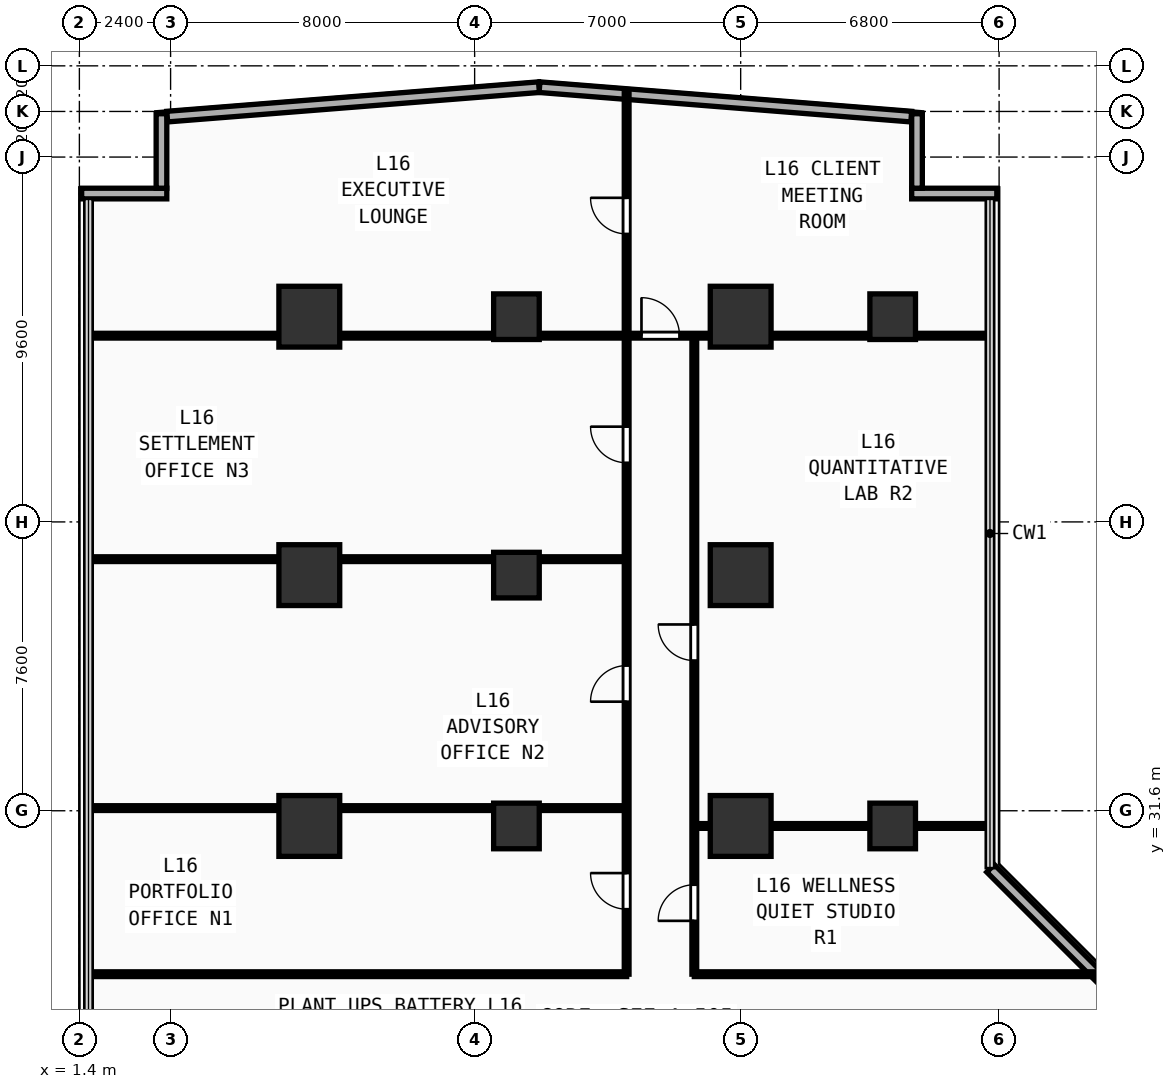
"""IFC4 building model, lengths in metres.
Left out: names, types, materials, properties, quantities, classifications, styles, units other than length and angle.
Written with IfcOpenShell. Run it as: python <this file> out.ifc"""

import sys

from ifc_helpers import new_model, si_unit, direction, frame, frame_2d, origin, origin_2d, place, context, subcontext, project, spatial, rectangle, extrude, element, fill, save


model = new_model("IFC4")
c1 = context("Model", 3, precision=1e-05, world=origin(), true_north=direction((0.0, 1.0)))
c2 = subcontext(c1, "Body", "Model", "MODEL_VIEW")
j1 = project(units=[si_unit("LENGTHUNIT", "METRE"), si_unit("PLANEANGLEUNIT", "RADIAN")], contexts=[c1])
p1 = place(None, origin())
s1 = spatial("IfcSite", under=j1, at=p1, CompositionType="ELEMENT")
p2 = place(p1, origin())
s2 = spatial("IfcBuilding", under=s1, at=p2, CompositionType="ELEMENT")
p3 = place(p2, frame((0.0, 0.0, 63.8)))
s3 = spatial("IfcBuildingStorey", under=s2, at=p3, CompositionType="ELEMENT", Elevation=63.8)
for number, where, z_axis, x_axis in (
    (1, (7.45, 31.2, 0.0), (0.0, 0.0, 1.0), (1.0, 0.0, 0.0)),
    (2, (7.45, 37.8, 0.0), (0.0, 0.0, 1.0), (1.0, 0.0, 0.0)),
    (3, (7.45, 44.6, 0.0), (0.0, 0.0, 1.0), (1.0, 0.0, 0.0)),
    (4, (18.8, 31.2, 0.0), (0.0, 0.0, 1.0), (1.0, 0.0, 0.0)),
    (5, (18.8, 37.8, 0.0), (0.0, 0.0, 1.0), (1.0, 0.0, 0.0)),
    (6, (18.8, 44.6, 0.0), (0.0, 0.0, 1.0), (1.0, 0.0, 0.0)),
):
    element("IfcColumn", number, at=place(p3, frame(where, z_axis=z_axis, x_axis=x_axis)), inside=s3, PredefinedType="COLUMN", context=c2, shape_type="SweptSolid", body=[
        extrude(rectangle(XDim=1.6, YDim=1.6, at=origin_2d()), origin(), (0.0, 0.0, 1.0), 3.54),
    ])
for number, where, z_axis, x_axis in (
    (7, (22.8, 31.2, 0.0), (0.0, 0.0, 1.0), (1.0, 0.0, 0.0)),
    (8, (22.8, 44.6, 0.0), (0.0, 0.0, 1.0), (1.0, 0.0, 0.0)),
    (9, (12.9, 31.2, 0.0), (0.0, 0.0, 1.0), (1.0, 0.0, 0.0)),
    (10, (12.9, 37.8, 0.0), (0.0, 0.0, 1.0), (1.0, 0.0, 0.0)),
    (11, (12.9, 44.6, 0.0), (0.0, 0.0, 1.0), (1.0, 0.0, 0.0)),
):
    element("IfcColumn", number, at=place(p3, frame(where, z_axis=z_axis, x_axis=x_axis)), inside=s3, PredefinedType="COLUMN", context=c2, shape_type="SweptSolid", body=[
        extrude(rectangle(XDim=1.2, YDim=1.2, at=origin_2d()), origin(), (0.0, 0.0, 1.0), 3.54),
    ])
p4 = place(p3, frame((23.3, 47.84, 0.0), z_axis=(0.0, 0.0, 1.0), x_axis=(1.0, 0.0, 0.0)))
e12 = element("IfcWall", 12, at=p4, inside=s3, PredefinedType="SOLIDWALL", context=c2, shape_type="SweptSolid", body=[
    extrude(rectangle(XDim=2.24, YDim=0.28, at=frame_2d((1.12, 0.0))), origin(), (0.0, 0.0, 1.0), 3.54),
])
p5 = place(p3, frame((23.44, 47.98, 0.0), z_axis=(0.0, 0.0, 1.0), x_axis=(0.0, 1.0, 0.0)))
e13 = element("IfcWall", 13, at=p5, inside=s3, PredefinedType="SOLIDWALL", context=c2, shape_type="SweptSolid", body=[
    extrude(rectangle(XDim=1.96, YDim=0.28, at=frame_2d((0.98, 0.0))), origin(), (0.0, 0.0, 1.0), 3.54),
])
p6 = place(p3, frame((1.46, 47.84, 0.0), z_axis=(0.0, 0.0, 1.0), x_axis=(1.0, 0.0, 0.0)))
e14 = element("IfcWall", 14, at=p6, inside=s3, PredefinedType="SOLIDWALL", context=c2, shape_type="SweptSolid", body=[
    extrude(rectangle(XDim=2.24, YDim=0.28, at=frame_2d((1.12, 0.0))), origin(), (0.0, 0.0, 1.0), 3.54),
])
p7 = place(p3, frame((3.56, 47.98, 0.0), z_axis=(0.0, 0.0, 1.0), x_axis=(0.0, 1.0, 0.0)))
e15 = element("IfcWall", 15, at=p7, inside=s3, PredefinedType="SOLIDWALL", context=c2, shape_type="SweptSolid", body=[
    extrude(rectangle(XDim=1.96, YDim=0.28, at=frame_2d((0.98, 0.0))), origin(), (0.0, 0.0, 1.0), 3.54),
])
p8 = place(p3, frame((31.885, 23.575, 0.0), z_axis=(0.0, 0.0, 1.0), x_axis=(-0.707106781187, 0.707106781187, 0.0)))
e16 = element("IfcWall", 16, at=p8, inside=s3, PredefinedType="SOLIDWALL", context=c2, shape_type="SweptSolid", body=[
    extrude(rectangle(XDim=9.207, YDim=0.28, at=frame_2d((4.603, 0.0))), origin(), (0.0, 0.0, 1.0), 3.54),
])
for number, where, z_axis, x_axis in (
    (17, (23.288, 49.864, 0.0), (0.0, 0.0, 1.0), (-0.997, 0.079, 0.0)),
    (18, (13.493, 50.639, 0.0), (0.0, 0.0, 1.0), (-0.997, -0.079, 0.0)),
):
    element("IfcWall", number, at=place(p3, frame(where, z_axis=z_axis, x_axis=x_axis)), inside=s3, PredefinedType="SOLIDWALL", context=c2, shape_type="SweptSolid", body=[
        extrude(rectangle(XDim=9.812, YDim=0.28, at=frame_2d((4.906, 0.0))), origin(), (0.0, 0.0, 1.0), 3.54),
    ])
p9 = place(p3, frame((1.64, 27.3, 0.0), z_axis=(0.0, 0.0, 1.0), x_axis=(1.0, 0.0, 0.0)))
e19 = element("IfcWall", 19, at=p9, inside=s3, PredefinedType="PARTITIONING", context=c2, shape_type="SweptSolid", body=[
    extrude(rectangle(XDim=14.16, YDim=0.125, at=frame_2d((7.08, 0.0))), origin(), (0.0, 0.0, 1.0), 3.54),
])
p10 = place(p3, frame((15.8, 27.3, 0.0), z_axis=(0.0, 0.0, 1.0), x_axis=(0.0, 1.0, 0.0)))
e20 = element("IfcWall", 20, at=p10, inside=s3, PredefinedType="PARTITIONING", context=c2, shape_type="SweptSolid", body=[
    extrude(rectangle(XDim=16.8, YDim=0.125, at=frame_2d((8.4, 0.0))), origin(), (0.0, 0.0, 1.0), 3.54),
])
p11 = place(p10, frame((1.71, 0.0, 0.0)))
e21 = element("IfcOpeningElement", 21, at=p11, cuts=e20, PredefinedType="OPENING", context=c2, shape_type="SweptSolid", body=[
    extrude(rectangle(XDim=0.95, YDim=2.15, at=frame_2d((0.475, 1.075))), frame((0.0, 0.073, 0.0), z_axis=(0.0, -1.0, 0.0), x_axis=(1.0, 0.0, 0.0)), (0.0, 0.0, 1.0), 0.145),
])
p12 = place(p10, frame((7.17, 0.0, 0.0)))
e22 = element("IfcOpeningElement", 22, at=p12, cuts=e20, PredefinedType="OPENING", context=c2, shape_type="SweptSolid", body=[
    extrude(rectangle(XDim=0.95, YDim=2.15, at=frame_2d((0.475, 1.075))), frame((0.0, 0.073, 0.0), z_axis=(0.0, -1.0, 0.0), x_axis=(1.0, 0.0, 0.0)), (0.0, 0.0, 1.0), 0.145),
])
p13 = place(p10, frame((13.456, 0.0, 0.0)))
e23 = element("IfcOpeningElement", 23, at=p13, cuts=e20, PredefinedType="OPENING", context=c2, shape_type="SweptSolid", body=[
    extrude(rectangle(XDim=0.95, YDim=2.15, at=frame_2d((0.475, 1.075))), frame((0.0, 0.073, 0.0), z_axis=(0.0, -1.0, 0.0), x_axis=(1.0, 0.0, 0.0)), (0.0, 0.0, 1.0), 0.145),
])
for number, where, z_axis, x_axis in (
    (24, (1.64, 31.67, 0.0), (0.0, 0.0, 1.0), (1.0, 0.0, 0.0)),
    (25, (1.64, 38.22, 0.0), (0.0, 0.0, 1.0), (1.0, 0.0, 0.0)),
):
    element("IfcWall", number, at=place(p3, frame(where, z_axis=z_axis, x_axis=x_axis)), inside=s3, PredefinedType="PARTITIONING", context=c2, shape_type="SweptSolid", body=[
        extrude(rectangle(XDim=14.16, YDim=0.125, at=frame_2d((7.08, 0.0))), origin(), (0.0, 0.0, 1.0), 3.54),
    ])
p14 = place(p3, frame((1.64, 44.1, 0.0), z_axis=(0.0, 0.0, 1.0), x_axis=(1.0, 0.0, 0.0)))
e26 = element("IfcWall", 26, at=p14, inside=s3, PredefinedType="PARTITIONING", context=c2, shape_type="SweptSolid", body=[
    extrude(rectangle(XDim=23.72, YDim=0.125, at=frame_2d((11.86, 0.0))), origin(), (0.0, 0.0, 1.0), 3.54),
])
p15 = place(p14, frame((14.55, 0.0, 0.0)))
e27 = element("IfcOpeningElement", 27, at=p15, cuts=e26, PredefinedType="OPENING", context=c2, shape_type="SweptSolid", body=[
    extrude(rectangle(XDim=1.0, YDim=2.2, at=frame_2d((0.5, 1.1))), frame((0.0, 0.073, 0.0), z_axis=(0.0, -1.0, 0.0), x_axis=(1.0, 0.0, 0.0)), (0.0, 0.0, 1.0), 0.145),
])
p16 = place(p3, frame((15.8, 44.1, 0.0), z_axis=(0.0, 0.0, 1.0), x_axis=(0.0, 1.0, 0.0)))
e28 = element("IfcWall", 28, at=p16, inside=s3, PredefinedType="PARTITIONING", context=c2, shape_type="SweptSolid", body=[
    extrude(rectangle(XDim=6.46, YDim=0.125, at=frame_2d((3.23, 0.0))), origin(), (0.0, 0.0, 1.0), 3.54),
])
p17 = place(p16, frame((2.677, 0.0, 0.0)))
e29 = element("IfcOpeningElement", 29, at=p17, cuts=e28, PredefinedType="OPENING", context=c2, shape_type="SweptSolid", body=[
    extrude(rectangle(XDim=0.95, YDim=2.15, at=frame_2d((0.475, 1.075))), frame((0.0, 0.073, 0.0), z_axis=(0.0, -1.0, 0.0), x_axis=(1.0, 0.0, 0.0)), (0.0, 0.0, 1.0), 0.145),
])
p18 = place(p3, frame((17.58, 27.3, 0.0), z_axis=(0.0, 0.0, 1.0), x_axis=(1.0, 0.0, 0.0)))
e30 = element("IfcWall", 30, at=p18, inside=s3, PredefinedType="PARTITIONING", context=c2, shape_type="SweptSolid", body=[
    extrude(rectangle(XDim=10.68, YDim=0.125, at=frame_2d((5.34, 0.0))), origin(), (0.0, 0.0, 1.0), 3.54),
])
p19 = place(p3, frame((17.58, 27.3, 0.0), z_axis=(0.0, 0.0, 1.0), x_axis=(0.0, 1.0, 0.0)))
e31 = element("IfcWall", 31, at=p19, inside=s3, PredefinedType="PARTITIONING", context=c2, shape_type="SweptSolid", body=[
    extrude(rectangle(XDim=16.8, YDim=0.125, at=frame_2d((8.4, 0.0))), origin(), (0.0, 0.0, 1.0), 3.54),
])
p20 = place(p19, frame((1.403, 0.0, 0.0)))
e32 = element("IfcOpeningElement", 32, at=p20, cuts=e31, PredefinedType="OPENING", context=c2, shape_type="SweptSolid", body=[
    extrude(rectangle(XDim=0.95, YDim=2.15, at=frame_2d((0.475, 1.075))), frame((0.0, 0.073, 0.0), z_axis=(0.0, -1.0, 0.0), x_axis=(1.0, 0.0, 0.0)), (0.0, 0.0, 1.0), 0.145),
])
p21 = place(p19, frame((8.252, 0.0, 0.0)))
e33 = element("IfcOpeningElement", 33, at=p21, cuts=e31, PredefinedType="OPENING", context=c2, shape_type="SweptSolid", body=[
    extrude(rectangle(XDim=0.95, YDim=2.15, at=frame_2d((0.475, 1.075))), frame((0.0, 0.073, 0.0), z_axis=(0.0, -1.0, 0.0), x_axis=(1.0, 0.0, 0.0)), (0.0, 0.0, 1.0), 0.145),
])
p22 = place(p3, frame((17.58, 31.2, 0.0), z_axis=(0.0, 0.0, 1.0), x_axis=(1.0, 0.0, 0.0)))
e34 = element("IfcWall", 34, at=p22, inside=s3, PredefinedType="PARTITIONING", context=c2, shape_type="SweptSolid", body=[
    extrude(rectangle(XDim=7.78, YDim=0.125, at=frame_2d((3.89, 0.0))), origin(), (0.0, 0.0, 1.0), 2.94),
])
p23 = place(p11, origin())
e35 = element("IfcDoor", 35, at=p23, inside=s3, OperationType="SINGLE_SWING_RIGHT", PredefinedType="DOOR", context=c2, shape_type="SweptSolid", body=[
    extrude(rectangle(XDim=0.95, YDim=2.15, at=frame_2d((0.475, 1.075))), frame((0.0, 0.025, 0.0), z_axis=(0.0, -1.0, 0.0), x_axis=(1.0, 0.0, 0.0)), (0.0, 0.0, 1.0), 0.05),
])
fill(e21, e35)
p24 = place(p12, origin())
e36 = element("IfcDoor", 36, at=p24, inside=s3, OperationType="SINGLE_SWING_LEFT", PredefinedType="DOOR", context=c2, shape_type="SweptSolid", body=[
    extrude(rectangle(XDim=0.95, YDim=2.15, at=frame_2d((0.475, 1.075))), frame((0.0, 0.025, 0.0), z_axis=(0.0, -1.0, 0.0), x_axis=(1.0, 0.0, 0.0)), (0.0, 0.0, 1.0), 0.05),
])
fill(e22, e36)
p25 = place(p13, origin())
e37 = element("IfcDoor", 37, at=p25, inside=s3, OperationType="SINGLE_SWING_RIGHT", PredefinedType="DOOR", context=c2, shape_type="SweptSolid", body=[
    extrude(rectangle(XDim=0.95, YDim=2.15, at=frame_2d((0.475, 1.075))), frame((0.0, 0.025, 0.0), z_axis=(0.0, -1.0, 0.0), x_axis=(1.0, 0.0, 0.0)), (0.0, 0.0, 1.0), 0.05),
])
fill(e23, e37)
p26 = place(p15, origin())
e38 = element("IfcDoor", 38, at=p26, inside=s3, OperationType="SINGLE_SWING_LEFT", PredefinedType="DOOR", context=c2, shape_type="SweptSolid", body=[
    extrude(rectangle(XDim=1.0, YDim=2.2, at=frame_2d((0.5, 1.1))), frame((0.0, 0.025, 0.0), z_axis=(0.0, -1.0, 0.0), x_axis=(1.0, 0.0, 0.0)), (0.0, 0.0, 1.0), 0.05),
])
fill(e27, e38)
p27 = place(p17, origin())
e39 = element("IfcDoor", 39, at=p27, inside=s3, OperationType="SINGLE_SWING_RIGHT", PredefinedType="DOOR", context=c2, shape_type="SweptSolid", body=[
    extrude(rectangle(XDim=0.95, YDim=2.15, at=frame_2d((0.475, 1.075))), frame((0.0, 0.025, 0.0), z_axis=(0.0, -1.0, 0.0), x_axis=(1.0, 0.0, 0.0)), (0.0, 0.0, 1.0), 0.05),
])
fill(e29, e39)
p28 = place(p20, origin())
e40 = element("IfcDoor", 40, at=p28, inside=s3, OperationType="SINGLE_SWING_LEFT", PredefinedType="DOOR", context=c2, shape_type="SweptSolid", body=[
    extrude(rectangle(XDim=0.95, YDim=2.15, at=frame_2d((0.475, 1.075))), frame((0.0, 0.025, 0.0), z_axis=(0.0, -1.0, 0.0), x_axis=(1.0, 0.0, 0.0)), (0.0, 0.0, 1.0), 0.05),
])
fill(e32, e40)
p29 = place(p21, origin())
e41 = element("IfcDoor", 41, at=p29, inside=s3, OperationType="SINGLE_SWING_RIGHT", PredefinedType="DOOR", context=c2, shape_type="SweptSolid", body=[
    extrude(rectangle(XDim=0.95, YDim=2.15, at=frame_2d((0.475, 1.075))), frame((0.0, 0.025, 0.0), z_axis=(0.0, -1.0, 0.0), x_axis=(1.0, 0.0, 0.0)), (0.0, 0.0, 1.0), 0.05),
])
fill(e33, e41)
save(model, sys.argv[1])
